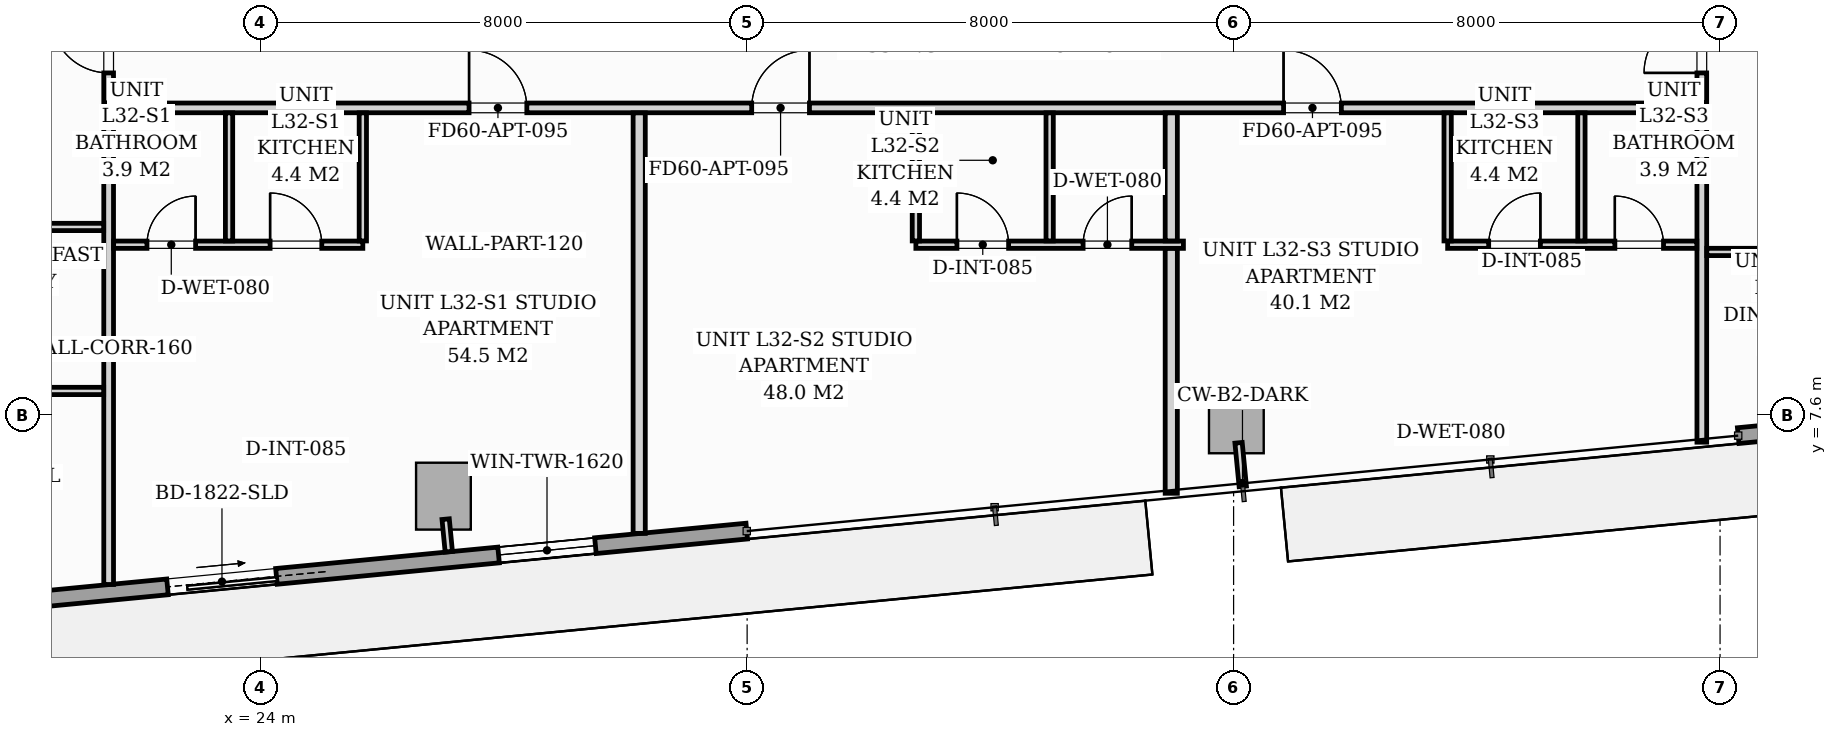
"""IFC4 building model, lengths in metres.
Left out: names, types, materials, properties, quantities, classifications, styles, units other than length and angle.
Written with IfcOpenShell. Run it as: python <this file> out.ifc"""

import sys

from ifc_helpers import new_model, si_unit, direction, frame, frame_2d, origin, origin_2d, place, context, subcontext, project, spatial, rectangle, extrude, source, transform, mapped, element, fill, save


model = new_model("IFC4")
c1 = context("Model", 3, precision=1e-05, world=origin(), true_north=direction((0.0, 1.0)))
c2 = subcontext(c1, "Body", "Model", "MODEL_VIEW")
j1 = project(units=[si_unit("LENGTHUNIT", "METRE"), si_unit("PLANEANGLEUNIT", "RADIAN")], contexts=[c1])
p1 = place(None, origin())
s1 = spatial("IfcSite", under=j1, at=p1, CompositionType="ELEMENT")
p2 = place(p1, origin())
s2 = spatial("IfcBuilding", under=s1, at=p2, CompositionType="ELEMENT")
p3 = place(p2, frame((0.0, 0.0, 113.0)))
s3 = spatial("IfcBuildingStorey", under=s2, at=p3, CompositionType="ELEMENT", Elevation=113.0)
m1 = source(origin(), c2, "Body", "SweptSolid", [
    extrude(rectangle(XDim=0.9, YDim=1.1, at=origin_2d()), origin(), (0.0, 0.0, 1.0), 3.196),
])
for number, where, z_axis, x_axis in (
    (1, (27.006, 6.265, 0.002), (0.0, 0.0, 1.0), (0.995, 0.096, 0.0)),
    (2, (40.045, 7.521, 0.002), (0.0, 0.0, 1.0), (0.995, 0.096, 0.0)),
):
    element("IfcColumn", number, at=place(p3, frame(where, z_axis=z_axis, x_axis=x_axis)), inside=s3, PredefinedType="COLUMN", context=c2, shape_type="MappedRepresentation", body=[
        mapped(m1, transform((0.0, 0.0, 0.0), scale=1.0)),
    ])
p4 = place(p3, frame((67.32, 9.092, 0.0), z_axis=(0.0, 0.0, 1.0), x_axis=(-0.995396521236, -0.095842399342, 0.0)))
e3 = element("IfcWall", 3, at=p4, inside=s3, PredefinedType="STANDARD", context=c2, shape_type="SweptSolid", body=[
    extrude(rectangle(XDim=19.11, YDim=0.26, at=frame_2d((9.555, 0.0))), origin(), (0.0, 0.0, 1.0), 2.94),
])
p5 = place(p4, frame((9.651, 0.0, 0.0)))
e4 = element("IfcOpeningElement", 4, at=p5, cuts=e3, PredefinedType="OPENING", context=c2, shape_type="SweptSolid", body=[
    extrude(rectangle(XDim=1.8, YDim=2.06, at=frame_2d((0.9, 1.03))), frame((0.0, 0.14, 0.0), z_axis=(0.0, -1.0, 0.0), x_axis=(1.0, 0.0, 0.0)), (0.0, 0.0, 1.0), 0.28),
])
p6 = place(p4, frame((2.05, 0.0, 0.65)))
e5 = element("IfcOpeningElement", 5, at=p6, cuts=e3, PredefinedType="OPENING", context=c2, shape_type="SweptSolid", body=[
    extrude(rectangle(XDim=1.6, YDim=1.5, at=frame_2d((0.8, 0.75))), frame((0.0, 0.14, 0.0), z_axis=(0.0, -1.0, 0.0), x_axis=(1.0, 0.0, 0.0)), (0.0, 0.0, 1.0), 0.28),
])
p7 = place(p3, frame((31.994, 5.69, 0.0), z_axis=(0.0, 0.0, 1.0), x_axis=(-0.995396521236, -0.095842399342, 0.0)))
e6 = element("IfcWall", 6, at=p7, inside=s3, PredefinedType="STANDARD", context=c2, shape_type="SweptSolid", body=[
    extrude(rectangle(XDim=19.11, YDim=0.26, at=frame_2d((9.555, 0.0))), origin(), (0.0, 0.0, 1.0), 2.94),
])
p8 = place(p7, frame((7.77, 0.0, 0.0)))
e7 = element("IfcOpeningElement", 7, at=p8, cuts=e6, PredefinedType="OPENING", context=c2, shape_type="SweptSolid", body=[
    extrude(rectangle(XDim=1.8, YDim=2.06, at=frame_2d((0.9, 1.03))), frame((0.0, 0.14, 0.0), z_axis=(0.0, -1.0, 0.0), x_axis=(1.0, 0.0, 0.0)), (0.0, 0.0, 1.0), 0.28),
])
p9 = place(p7, frame((2.5, 0.0, 0.65)))
e8 = element("IfcOpeningElement", 8, at=p9, cuts=e6, PredefinedType="OPENING", context=c2, shape_type="SweptSolid", body=[
    extrude(rectangle(XDim=1.6, YDim=1.5, at=frame_2d((0.8, 0.75))), frame((0.0, 0.14, 0.0), z_axis=(0.0, -1.0, 0.0), x_axis=(1.0, 0.0, 0.0)), (0.0, 0.0, 1.0), 0.28),
])
p10 = place(p3, frame((21.5, 12.65, 0.0), z_axis=(0.0, 0.0, 1.0), x_axis=(1.0, 0.0, 0.0)))
e9 = element("IfcWall", 9, at=p10, inside=s3, PredefinedType="PARTITIONING", context=c2, shape_type="SweptSolid", body=[
    extrude(rectangle(XDim=26.2, YDim=0.16, at=frame_2d((13.1, 0.0))), origin(), (0.0, 0.0, 1.0), 2.94),
])
p11 = place(p10, frame((5.927, 0.0, 0.0)))
e10 = element("IfcOpeningElement", 10, at=p11, cuts=e9, PredefinedType="OPENING", context=c2, shape_type="SweptSolid", body=[
    extrude(rectangle(XDim=0.95, YDim=2.06, at=frame_2d((0.475, 1.03))), frame((0.0, 0.09, 0.0), z_axis=(0.0, -1.0, 0.0), x_axis=(1.0, 0.0, 0.0)), (0.0, 0.0, 1.0), 0.18),
])
p12 = place(p10, frame((10.575, 0.0, 0.0)))
e11 = element("IfcOpeningElement", 11, at=p12, cuts=e9, PredefinedType="OPENING", context=c2, shape_type="SweptSolid", body=[
    extrude(rectangle(XDim=0.95, YDim=2.06, at=frame_2d((0.475, 1.03))), frame((0.0, 0.09, 0.0), z_axis=(0.0, -1.0, 0.0), x_axis=(1.0, 0.0, 0.0)), (0.0, 0.0, 1.0), 0.18),
])
p13 = place(p10, frame((19.322, 0.0, 0.0)))
e12 = element("IfcOpeningElement", 12, at=p13, cuts=e9, PredefinedType="OPENING", context=c2, shape_type="SweptSolid", body=[
    extrude(rectangle(XDim=0.95, YDim=2.06, at=frame_2d((0.475, 1.03))), frame((0.0, 0.09, 0.0), z_axis=(0.0, -1.0, 0.0), x_axis=(1.0, 0.0, 0.0)), (0.0, 0.0, 1.0), 0.18),
])
p14 = place(p3, frame((21.5, 4.812, 0.0), z_axis=(0.0, 0.0, 1.0), x_axis=(0.0, 1.0, 0.0)))
e13 = element("IfcWall", 13, at=p14, inside=s3, PredefinedType="PARTITIONING", context=c2, shape_type="SweptSolid", body=[
    extrude(rectangle(XDim=7.756, YDim=0.16, at=frame_2d((3.878, 0.0))), origin(), (0.0, 0.0, 1.0), 2.94),
])
p15 = place(p3, frame((21.5, 12.732, 0.0), z_axis=(0.0, 0.0, 1.0), x_axis=(0.0, 1.0, 0.0)))
e14 = element("IfcWall", 14, at=p15, inside=s3, PredefinedType="PARTITIONING", context=c2, shape_type="SweptSolid", body=[
    extrude(rectangle(XDim=11.647, YDim=0.16, at=frame_2d((5.823, 0.0))), origin(), (0.0, 0.0, 1.0), 2.94),
])
p16 = place(p15, frame((0.493, 0.0, 0.0)))
e15 = element("IfcOpeningElement", 15, at=p16, cuts=e14, PredefinedType="OPENING", context=c2, shape_type="SweptSolid", body=[
    extrude(rectangle(XDim=0.95, YDim=2.06, at=frame_2d((0.475, 1.03))), frame((0.0, 0.09, 0.0), z_axis=(0.0, -1.0, 0.0), x_axis=(1.0, 0.0, 0.0)), (0.0, 0.0, 1.0), 0.18),
])
p17 = place(p15, frame((6.085, 0.0, 0.0)))
e16 = element("IfcOpeningElement", 16, at=p17, cuts=e14, PredefinedType="OPENING", context=c2, shape_type="SweptSolid", body=[
    extrude(rectangle(XDim=0.95, YDim=2.06, at=frame_2d((0.475, 1.03))), frame((0.0, 0.09, 0.0), z_axis=(0.0, -1.0, 0.0), x_axis=(1.0, 0.0, 0.0)), (0.0, 0.0, 1.0), 0.18),
])
p18 = place(p3, frame((47.7, 7.153, 0.0), z_axis=(0.0, 0.0, 1.0), x_axis=(0.0, 1.0, 0.0)))
e17 = element("IfcWall", 17, at=p18, inside=s3, PredefinedType="PARTITIONING", context=c2, shape_type="SweptSolid", body=[
    extrude(rectangle(XDim=5.416, YDim=0.16, at=frame_2d((2.708, 0.0))), origin(), (0.0, 0.0, 1.0), 2.94),
])
p19 = place(p3, frame((47.7, 12.732, 0.0), z_axis=(0.0, 0.0, 1.0), x_axis=(0.0, 1.0, 0.0)))
e18 = element("IfcWall", 18, at=p19, inside=s3, PredefinedType="PARTITIONING", context=c2, shape_type="SweptSolid", body=[
    extrude(rectangle(XDim=7.918, YDim=0.16, at=frame_2d((3.959, 0.0))), origin(), (0.0, 0.0, 1.0), 2.94),
])
p20 = place(p19, frame((0.493, 0.0, 0.0)))
e19 = element("IfcOpeningElement", 19, at=p20, cuts=e18, PredefinedType="OPENING", context=c2, shape_type="SweptSolid", body=[
    extrude(rectangle(XDim=0.95, YDim=2.06, at=frame_2d((0.475, 1.03))), frame((0.0, 0.09, 0.0), z_axis=(0.0, -1.0, 0.0), x_axis=(1.0, 0.0, 0.0)), (0.0, 0.0, 1.0), 0.18),
])
p21 = place(p19, frame((6.311, 0.0, 0.0)))
e20 = element("IfcOpeningElement", 20, at=p21, cuts=e18, PredefinedType="OPENING", context=c2, shape_type="SweptSolid", body=[
    extrude(rectangle(XDim=0.95, YDim=2.06, at=frame_2d((0.475, 1.03))), frame((0.0, 0.09, 0.0), z_axis=(0.0, -1.0, 0.0), x_axis=(1.0, 0.0, 0.0)), (0.0, 0.0, 1.0), 0.18),
])
p22 = place(p3, frame((21.582, 10.4, 0.0), z_axis=(0.0, 0.0, 1.0), x_axis=(1.0, 0.0, 0.0)))
e21 = element("IfcWall", 21, at=p22, inside=s3, PredefinedType="PARTITIONING", context=c2, shape_type="SweptSolid", body=[
    extrude(rectangle(XDim=4.098, YDim=0.12, at=frame_2d((2.049, 0.0))), origin(), (0.0, 0.0, 1.0), 2.94),
])
p23 = place(p22, frame((0.548, 0.0, 0.0)))
e22 = element("IfcOpeningElement", 22, at=p23, cuts=e21, PredefinedType="OPENING", context=c2, shape_type="SweptSolid", body=[
    extrude(rectangle(XDim=0.8, YDim=2.02, at=frame_2d((0.4, 1.01))), frame((0.0, 0.07, 0.0), z_axis=(0.0, -1.0, 0.0), x_axis=(1.0, 0.0, 0.0)), (0.0, 0.0, 1.0), 0.14),
])
p24 = place(p22, frame((2.573, 0.0, 0.0)))
e23 = element("IfcOpeningElement", 23, at=p24, cuts=e21, PredefinedType="OPENING", context=c2, shape_type="SweptSolid", body=[
    extrude(rectangle(XDim=0.85, YDim=2.05, at=frame_2d((0.425, 1.025))), frame((0.0, 0.07, 0.0), z_axis=(0.0, -1.0, 0.0), x_axis=(1.0, 0.0, 0.0)), (0.0, 0.0, 1.0), 0.14),
])
for number, where, z_axis, x_axis in (
    (24, (25.68, 10.462, 0.0), (0.0, 0.0, 1.0), (0.0, 1.0, 0.0)),
    (25, (23.48, 10.462, 0.0), (0.0, 0.0, 1.0), (0.0, 1.0, 0.0)),
):
    element("IfcWall", number, at=place(p3, frame(where, z_axis=z_axis, x_axis=x_axis)), inside=s3, PredefinedType="PARTITIONING", context=c2, shape_type="SweptSolid", body=[
        extrude(rectangle(XDim=2.106, YDim=0.12, at=frame_2d((1.053, 0.0))), origin(), (0.0, 0.0, 1.0), 2.94),
    ])
p25 = place(p3, frame((30.225, 5.653, 0.0), z_axis=(0.0, 0.0, 1.0), x_axis=(0.0, 1.0, 0.0)))
e26 = element("IfcWall", 26, at=p25, inside=s3, PredefinedType="PARTITIONING", context=c2, shape_type="SweptSolid", body=[
    extrude(rectangle(XDim=6.916, YDim=0.2, at=frame_2d((3.458, 0.0))), origin(), (0.0, 0.0, 1.0), 2.94),
])
p26 = place(p3, frame((34.775, 10.4, 0.0), z_axis=(0.0, 0.0, 1.0), x_axis=(1.0, 0.0, 0.0)))
e27 = element("IfcWall", 27, at=p26, inside=s3, PredefinedType="PARTITIONING", context=c2, shape_type="SweptSolid", body=[
    extrude(rectangle(XDim=4.4, YDim=0.12, at=frame_2d((2.2, 0.0))), origin(), (0.0, 0.0, 1.0), 2.94),
])
p27 = place(p26, frame((0.675, 0.0, 0.0)))
e28 = element("IfcOpeningElement", 28, at=p27, cuts=e27, PredefinedType="OPENING", context=c2, shape_type="SweptSolid", body=[
    extrude(rectangle(XDim=0.85, YDim=2.05, at=frame_2d((0.425, 1.025))), frame((0.0, 0.07, 0.0), z_axis=(0.0, -1.0, 0.0), x_axis=(1.0, 0.0, 0.0)), (0.0, 0.0, 1.0), 0.14),
])
p28 = place(p26, frame((2.75, 0.0, 0.0)))
e29 = element("IfcOpeningElement", 29, at=p28, cuts=e27, PredefinedType="OPENING", context=c2, shape_type="SweptSolid", body=[
    extrude(rectangle(XDim=0.8, YDim=2.02, at=frame_2d((0.4, 1.01))), frame((0.0, 0.07, 0.0), z_axis=(0.0, -1.0, 0.0), x_axis=(1.0, 0.0, 0.0)), (0.0, 0.0, 1.0), 0.14),
])
for number, where, z_axis, x_axis in (
    (30, (34.775, 10.462, 0.0), (0.0, 0.0, 1.0), (0.0, 1.0, 0.0)),
    (31, (36.975, 10.462, 0.0), (0.0, 0.0, 1.0), (0.0, 1.0, 0.0)),
):
    element("IfcWall", number, at=place(p3, frame(where, z_axis=z_axis, x_axis=x_axis)), inside=s3, PredefinedType="PARTITIONING", context=c2, shape_type="SweptSolid", body=[
        extrude(rectangle(XDim=2.106, YDim=0.12, at=frame_2d((1.053, 0.0))), origin(), (0.0, 0.0, 1.0), 2.94),
    ])
p29 = place(p3, frame((38.975, 6.312, 0.0), z_axis=(0.0, 0.0, 1.0), x_axis=(0.0, 1.0, 0.0)))
e32 = element("IfcWall", 32, at=p29, inside=s3, PredefinedType="PARTITIONING", context=c2, shape_type="SweptSolid", body=[
    extrude(rectangle(XDim=4.025, YDim=0.2, at=frame_2d((2.013, 0.0))), origin(), (0.0, 0.0, 1.0), 2.94),
])
p30 = place(p3, frame((38.975, 10.462, 0.0), z_axis=(0.0, 0.0, 1.0), x_axis=(0.0, 1.0, 0.0)))
e33 = element("IfcWall", 33, at=p30, inside=s3, PredefinedType="PARTITIONING", context=c2, shape_type="SweptSolid", body=[
    extrude(rectangle(XDim=2.106, YDim=0.2, at=frame_2d((1.053, 0.0))), origin(), (0.0, 0.0, 1.0), 2.94),
])
p31 = place(p3, frame((43.52, 10.4, 0.0), z_axis=(0.0, 0.0, 1.0), x_axis=(1.0, 0.0, 0.0)))
e34 = element("IfcWall", 34, at=p31, inside=s3, PredefinedType="PARTITIONING", context=c2, shape_type="SweptSolid", body=[
    extrude(rectangle(XDim=4.098, YDim=0.12, at=frame_2d((2.049, 0.0))), origin(), (0.0, 0.0, 1.0), 2.94),
])
p32 = place(p31, frame((0.675, 0.0, 0.0)))
e35 = element("IfcOpeningElement", 35, at=p32, cuts=e34, PredefinedType="OPENING", context=c2, shape_type="SweptSolid", body=[
    extrude(rectangle(XDim=0.85, YDim=2.05, at=frame_2d((0.425, 1.025))), frame((0.0, 0.07, 0.0), z_axis=(0.0, -1.0, 0.0), x_axis=(1.0, 0.0, 0.0)), (0.0, 0.0, 1.0), 0.14),
])
p33 = place(p31, frame((2.75, 0.0, 0.0)))
e36 = element("IfcOpeningElement", 36, at=p33, cuts=e34, PredefinedType="OPENING", context=c2, shape_type="SweptSolid", body=[
    extrude(rectangle(XDim=0.8, YDim=2.02, at=frame_2d((0.4, 1.01))), frame((0.0, 0.07, 0.0), z_axis=(0.0, -1.0, 0.0), x_axis=(1.0, 0.0, 0.0)), (0.0, 0.0, 1.0), 0.14),
])
for number, where, z_axis, x_axis in (
    (37, (43.52, 10.462, 0.0), (0.0, 0.0, 1.0), (0.0, 1.0, 0.0)),
    (38, (45.72, 10.462, 0.0), (0.0, 0.0, 1.0), (0.0, 1.0, 0.0)),
):
    element("IfcWall", number, at=place(p3, frame(where, z_axis=z_axis, x_axis=x_axis)), inside=s3, PredefinedType="PARTITIONING", context=c2, shape_type="SweptSolid", body=[
        extrude(rectangle(XDim=2.106, YDim=0.12, at=frame_2d((1.053, 0.0))), origin(), (0.0, 0.0, 1.0), 2.94),
    ])
p34 = place(p3, frame((12.377, 7.995, 0.0), z_axis=(0.0, 0.0, 1.0), x_axis=(1.0, 0.0, 0.0)))
e39 = element("IfcWall", 39, at=p34, inside=s3, PredefinedType="PARTITIONING", context=c2, shape_type="SweptSolid", body=[
    extrude(rectangle(XDim=9.041, YDim=0.12, at=frame_2d((4.521, 0.0))), origin(), (0.0, 0.0, 1.0), 2.94),
])
p35 = place(p34, frame((4.096, 0.0, 0.0)))
e40 = element("IfcOpeningElement", 40, at=p35, cuts=e39, PredefinedType="OPENING", context=c2, shape_type="SweptSolid", body=[
    extrude(rectangle(XDim=0.85, YDim=2.05, at=frame_2d((0.425, 1.025))), frame((0.0, 0.07, 0.0), z_axis=(0.0, -1.0, 0.0), x_axis=(1.0, 0.0, 0.0)), (0.0, 0.0, 1.0), 0.14),
])
p36 = place(p3, frame((12.377, 10.692, 0.0), z_axis=(0.0, 0.0, 1.0), x_axis=(1.0, 0.0, 0.0)))
e41 = element("IfcWall", 41, at=p36, inside=s3, PredefinedType="PARTITIONING", context=c2, shape_type="SweptSolid", body=[
    extrude(rectangle(XDim=9.041, YDim=0.12, at=frame_2d((4.521, 0.0))), origin(), (0.0, 0.0, 1.0), 2.94),
])
p37 = place(p36, frame((4.096, 0.0, 0.0)))
e42 = element("IfcOpeningElement", 42, at=p37, cuts=e41, PredefinedType="OPENING", context=c2, shape_type="SweptSolid", body=[
    extrude(rectangle(XDim=0.85, YDim=2.05, at=frame_2d((0.425, 1.025))), frame((0.0, 0.07, 0.0), z_axis=(0.0, -1.0, 0.0), x_axis=(1.0, 0.0, 0.0)), (0.0, 0.0, 1.0), 0.14),
])
p38 = place(p3, frame((47.782, 10.281, 0.0), z_axis=(0.0, 0.0, 1.0), x_axis=(1.0, 0.0, 0.0)))
e43 = element("IfcWall", 43, at=p38, inside=s3, PredefinedType="PARTITIONING", context=c2, shape_type="SweptSolid", body=[
    extrude(rectangle(XDim=18.472, YDim=0.12, at=frame_2d((9.236, 0.0))), origin(), (0.0, 0.0, 1.0), 2.94),
])
p39 = place(p38, frame((8.811, 0.0, 0.0)))
e44 = element("IfcOpeningElement", 44, at=p39, cuts=e43, PredefinedType="OPENING", context=c2, shape_type="SweptSolid", body=[
    extrude(rectangle(XDim=0.85, YDim=2.05, at=frame_2d((0.425, 1.025))), frame((0.0, 0.07, 0.0), z_axis=(0.0, -1.0, 0.0), x_axis=(1.0, 0.0, 0.0)), (0.0, 0.0, 1.0), 0.14),
])
p40 = place(p3, frame((27.042, 5.887, 0.0), z_axis=(0.0, 0.0, 1.0), x_axis=(0.096222656154, -0.995359834654, 0.0)))
e45 = element("IfcWall", 45, at=p40, inside=s3, PredefinedType="PARTITIONING", context=c2, shape_type="SweptSolid", body=[
    extrude(rectangle(XDim=0.538, YDim=0.12, at=frame_2d((0.269, 0.0))), origin(), (0.0, 0.0, 1.0), 2.94),
])
p41 = place(p3, frame((40.082, 7.142, 0.0), z_axis=(0.0, 0.0, 1.0), x_axis=(0.095944965663, -0.995386640238, 0.0)))
e46 = element("IfcWall", 46, at=p41, inside=s3, PredefinedType="PARTITIONING", context=c2, shape_type="SweptSolid", body=[
    extrude(rectangle(XDim=0.72, YDim=0.12, at=frame_2d((0.36, 0.0))), origin(), (0.0, 0.0, 1.0), 2.94),
])
m2 = source(origin(), c2, "Body", "SweptSolid", [
    extrude(rectangle(XDim=1.8, YDim=2.06, at=frame_2d((0.9, 1.03))), frame((0.0, 0.025, 0.0), z_axis=(0.0, -1.0, 0.0), x_axis=(1.0, 0.0, 0.0)), (0.0, 0.0, 1.0), 0.05),
])
p42 = place(p8, origin())
e47 = element("IfcDoor", 47, at=p42, inside=s3, OperationType="SLIDING_TO_LEFT", PredefinedType="DOOR", context=c2, shape_type="MappedRepresentation", body=[
    mapped(m2, transform((0.0, 0.0, 0.0), scale=1.0)),
])
fill(e7, e47)
m3 = source(origin(), c2, "Body", "SweptSolid", [
    extrude(rectangle(XDim=1.6, YDim=1.5, at=frame_2d((0.8, 0.75))), frame((0.0, 0.03, 0.0), z_axis=(0.0, -1.0, 0.0), x_axis=(1.0, 0.0, 0.0)), (0.0, 0.0, 1.0), 0.06),
])
p43 = place(p9, origin())
e48 = element("IfcWindow", 48, at=p43, inside=s3, PartitioningType="SINGLE_PANEL", PredefinedType="WINDOW", context=c2, shape_type="MappedRepresentation", body=[
    mapped(m3, transform((0.0, 0.0, 0.0), scale=1.0)),
])
fill(e8, e48)
m4 = source(origin(), c2, "Body", "SweptSolid", [
    extrude(rectangle(XDim=0.95, YDim=2.06, at=frame_2d((0.475, 1.03))), frame((0.0, 0.025, 0.0), z_axis=(0.0, -1.0, 0.0), x_axis=(1.0, 0.0, 0.0)), (0.0, 0.0, 1.0), 0.05),
])
p44 = place(p11, origin())
e49 = element("IfcDoor", 49, at=p44, inside=s3, OperationType="SINGLE_SWING_LEFT", PredefinedType="DOOR", context=c2, shape_type="MappedRepresentation", body=[
    mapped(m4, transform((0.0, 0.0, 0.0), scale=1.0)),
])
fill(e10, e49)
m5 = source(origin(), c2, "Body", "SweptSolid", [
    extrude(rectangle(XDim=0.8, YDim=2.02, at=frame_2d((0.4, 1.01))), frame((0.0, 0.025, 0.0), z_axis=(0.0, -1.0, 0.0), x_axis=(1.0, 0.0, 0.0)), (0.0, 0.0, 1.0), 0.05),
])
p45 = place(p23, origin())
e50 = element("IfcDoor", 50, at=p45, inside=s3, OperationType="SINGLE_SWING_RIGHT", PredefinedType="DOOR", context=c2, shape_type="MappedRepresentation", body=[
    mapped(m5, transform((0.0, 0.0, 0.0), scale=1.0)),
])
fill(e22, e50)
m6 = source(origin(), c2, "Body", "SweptSolid", [
    extrude(rectangle(XDim=0.85, YDim=2.05, at=frame_2d((0.425, 1.025))), frame((0.0, 0.025, 0.0), z_axis=(0.0, -1.0, 0.0), x_axis=(1.0, 0.0, 0.0)), (0.0, 0.0, 1.0), 0.05),
])
p46 = place(p24, origin())
e51 = element("IfcDoor", 51, at=p46, inside=s3, OperationType="SINGLE_SWING_LEFT", PredefinedType="DOOR", context=c2, shape_type="MappedRepresentation", body=[
    mapped(m6, transform((0.0, 0.0, 0.0), scale=1.0)),
])
fill(e23, e51)
p47 = place(p12, origin())
e52 = element("IfcDoor", 52, at=p47, inside=s3, OperationType="SINGLE_SWING_RIGHT", PredefinedType="DOOR", context=c2, shape_type="MappedRepresentation", body=[
    mapped(m4, transform((0.0, 0.0, 0.0), scale=1.0)),
])
fill(e11, e52)
p48 = place(p27, origin())
e53 = element("IfcDoor", 53, at=p48, inside=s3, OperationType="SINGLE_SWING_LEFT", PredefinedType="DOOR", context=c2, shape_type="MappedRepresentation", body=[
    mapped(m6, transform((0.0, 0.0, 0.0), scale=1.0)),
])
fill(e28, e53)
p49 = place(p28, origin())
e54 = element("IfcDoor", 54, at=p49, inside=s3, OperationType="SINGLE_SWING_RIGHT", PredefinedType="DOOR", context=c2, shape_type="MappedRepresentation", body=[
    mapped(m5, transform((0.0, 0.0, 0.0), scale=1.0)),
])
fill(e29, e54)
p50 = place(p13, origin())
e55 = element("IfcDoor", 55, at=p50, inside=s3, OperationType="SINGLE_SWING_LEFT", PredefinedType="DOOR", context=c2, shape_type="MappedRepresentation", body=[
    mapped(m4, transform((0.0, 0.0, 0.0), scale=1.0)),
])
fill(e12, e55)
p51 = place(p32, origin())
e56 = element("IfcDoor", 56, at=p51, inside=s3, OperationType="SINGLE_SWING_RIGHT", PredefinedType="DOOR", context=c2, shape_type="MappedRepresentation", body=[
    mapped(m6, transform((0.0, 0.0, 0.0), scale=1.0)),
])
fill(e35, e56)
p52 = place(p33, origin())
e57 = element("IfcDoor", 57, at=p52, inside=s3, OperationType="SINGLE_SWING_LEFT", PredefinedType="DOOR", context=c2, shape_type="MappedRepresentation", body=[
    mapped(m5, transform((0.0, 0.0, 0.0), scale=1.0)),
])
fill(e36, e57)
p53 = place(p16, origin())
e58 = element("IfcDoor", 58, at=p53, inside=s3, OperationType="SINGLE_SWING_RIGHT", PredefinedType="DOOR", context=c2, shape_type="MappedRepresentation", body=[
    mapped(m4, transform((0.0, 0.0, 0.0), scale=1.0)),
])
fill(e15, e58)
p54 = place(p20, origin())
e59 = element("IfcDoor", 59, at=p54, inside=s3, OperationType="SINGLE_SWING_LEFT", PredefinedType="DOOR", context=c2, shape_type="MappedRepresentation", body=[
    mapped(m4, transform((0.0, 0.0, 0.0), scale=1.0)),
])
fill(e19, e59)
save(model, sys.argv[1])
